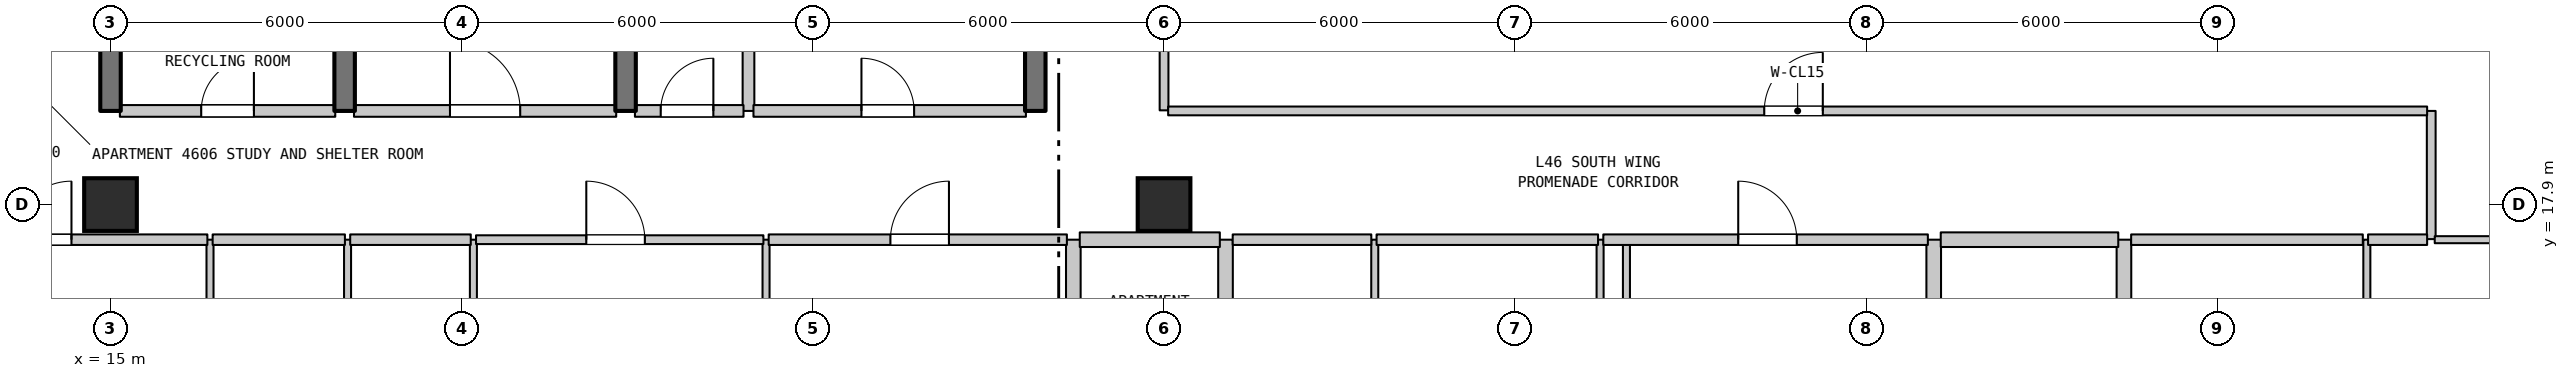
"""IFC4 building model, lengths in metres.
Left out: names, types, materials, properties, quantities, classifications, styles, units other than length and angle.
Written with IfcOpenShell. Run it as: python <this file> out.ifc"""

import sys

from ifc_helpers import new_model, si_unit, direction, frame, frame_2d, origin, origin_2d, place, context, subcontext, project, spatial, rectangle, extrude, element, fill, save


model = new_model("IFC4")
c1 = context("Model", 3, precision=1e-05, world=origin(), true_north=direction((0.0, 1.0)))
c2 = subcontext(c1, "Body", "Model", "MODEL_VIEW")
j1 = project(units=[si_unit("LENGTHUNIT", "METRE"), si_unit("PLANEANGLEUNIT", "RADIAN")], contexts=[c1])
p1 = place(None, origin())
s1 = spatial("IfcSite", under=j1, at=p1, CompositionType="ELEMENT")
p2 = place(p1, origin())
s2 = spatial("IfcBuilding", under=s1, at=p2, CompositionType="ELEMENT")
p3 = place(p2, frame((0.0, 0.0, 188.4)))
s3 = spatial("IfcBuildingStorey", under=s2, at=p3, CompositionType="ELEMENT", Elevation=188.4)
for number, where, z_axis, x_axis in (
    (1, (15.0, 17.9, 0.0), (0.0, 0.0, 1.0), (1.0, 0.0, 0.0)),
    (2, (33.0, 17.9, 0.0), (0.0, 0.0, 1.0), (1.0, 0.0, 0.0)),
):
    element("IfcColumn", number, at=place(p3, frame(where, z_axis=z_axis, x_axis=x_axis)), inside=s3, PredefinedType="COLUMN", context=c2, shape_type="SweptSolid", body=[
        extrude(rectangle(XDim=0.9, YDim=0.9, at=origin_2d()), origin(), (0.0, 0.0, 1.0), 3.7),
    ])
p4 = place(p3, frame((15.0, 19.5, 0.0), z_axis=(0.0, 0.0, 1.0), x_axis=(0.0, 1.0, 0.0)))
e3 = element("IfcWall", 3, at=p4, inside=s3, PredefinedType="SHEAR", context=c2, shape_type="SweptSolid", body=[
    extrude(rectangle(XDim=3.2, YDim=0.35, at=frame_2d((1.6, 0.0))), origin(), (0.0, 0.0, 1.0), 3.39),
])
p5 = place(p3, frame((16.7, 14.1, 0.0), z_axis=(0.0, 0.0, 1.0), x_axis=(0.0, 1.0, 0.0)))
e4 = element("IfcWall", 4, at=p5, inside=s3, PredefinedType="PARTITIONING", context=c2, shape_type="SweptSolid", body=[
    extrude(rectangle(XDim=3.2, YDim=0.12, at=frame_2d((1.6, 0.0))), origin(), (0.0, 0.0, 1.0), 3.39),
])
p6 = place(p5, frame((1.15, 0.0, 0.0)))
e5 = element("IfcOpeningElement", 5, at=p6, cuts=e4, PredefinedType="OPENING", context=c2, shape_type="SweptSolid", body=[
    extrude(rectangle(XDim=0.9, YDim=2.15, at=frame_2d((0.45, 1.075))), frame((0.0, 0.07, 0.0), z_axis=(0.0, -1.0, 0.0), x_axis=(1.0, 0.0, 0.0)), (0.0, 0.0, 1.0), 0.14),
])
p7 = place(p3, frame((19.0, 19.5, 0.0), z_axis=(0.0, 0.0, 1.0), x_axis=(0.0, 1.0, 0.0)))
e6 = element("IfcWall", 6, at=p7, inside=s3, PredefinedType="SHEAR", context=c2, shape_type="SweptSolid", body=[
    extrude(rectangle(XDim=3.2, YDim=0.35, at=frame_2d((1.6, 0.0))), origin(), (0.0, 0.0, 1.0), 3.39),
])
p8 = place(p3, frame((19.05, 14.1, 0.0), z_axis=(0.0, 0.0, 1.0), x_axis=(0.0, 1.0, 0.0)))
e7 = element("IfcWall", 7, at=p8, inside=s3, PredefinedType="PARTITIONING", context=c2, shape_type="SweptSolid", body=[
    extrude(rectangle(XDim=3.2, YDim=0.12, at=frame_2d((1.6, 0.0))), origin(), (0.0, 0.0, 1.0), 3.39),
])
p9 = place(p3, frame((21.2, 2.227, 0.0), z_axis=(0.0, 0.0, 1.0), x_axis=(0.0, 1.0, 0.0)))
e8 = element("IfcWall", 8, at=p9, inside=s3, PredefinedType="PARTITIONING", context=c2, shape_type="SweptSolid", body=[
    extrude(rectangle(XDim=15.073, YDim=0.12, at=frame_2d((7.537, 0.0))), origin(), (0.0, 0.0, 1.0), 3.39),
])
p10 = place(p3, frame((23.8, 19.5, 0.0), z_axis=(0.0, 0.0, 1.0), x_axis=(0.0, 1.0, 0.0)))
e9 = element("IfcWall", 9, at=p10, inside=s3, PredefinedType="SHEAR", context=c2, shape_type="SweptSolid", body=[
    extrude(rectangle(XDim=3.2, YDim=0.35, at=frame_2d((1.6, 0.0))), origin(), (0.0, 0.0, 1.0), 3.39),
])
p11 = place(p3, frame((25.9, 19.5, 0.0), z_axis=(0.0, 0.0, 1.0), x_axis=(0.0, 1.0, 0.0)))
e10 = element("IfcWall", 10, at=p11, inside=s3, PredefinedType="STANDARD", context=c2, shape_type="SweptSolid", body=[
    extrude(rectangle(XDim=3.2, YDim=0.2, at=frame_2d((1.6, 0.0))), origin(), (0.0, 0.0, 1.0), 3.39),
])
p12 = place(p3, frame((26.2, 14.85, 0.0), z_axis=(0.0, 0.0, 1.0), x_axis=(0.0, 1.0, 0.0)))
e11 = element("IfcWall", 11, at=p12, inside=s3, PredefinedType="PARTITIONING", context=c2, shape_type="SweptSolid", body=[
    extrude(rectangle(XDim=2.45, YDim=0.12, at=frame_2d((1.225, 0.0))), origin(), (0.0, 0.0, 1.0), 3.39),
])
p13 = place(p3, frame((30.8, 19.5, 0.0), z_axis=(0.0, 0.0, 1.0), x_axis=(0.0, 1.0, 0.0)))
e12 = element("IfcWall", 12, at=p13, inside=s3, PredefinedType="SHEAR", context=c2, shape_type="SweptSolid", body=[
    extrude(rectangle(XDim=3.2, YDim=0.35, at=frame_2d((1.6, 0.0))), origin(), (0.0, 0.0, 1.0), 3.39),
])
p14 = place(p3, frame((31.45, 11.15, 0.0), z_axis=(0.0, 0.0, 1.0), x_axis=(0.0, 1.0, 0.0)))
e13 = element("IfcWall", 13, at=p14, inside=s3, PredefinedType="STANDARD", context=c2, shape_type="SweptSolid", body=[
    extrude(rectangle(XDim=6.15, YDim=0.25, at=frame_2d((3.075, 0.0))), origin(), (0.0, 0.0, 1.0), 3.39),
])
p15 = place(p14, frame((2.529, 0.0, 0.0)))
e14 = element("IfcOpeningElement", 14, at=p15, cuts=e13, PredefinedType="OPENING", context=c2, shape_type="SweptSolid", body=[
    extrude(rectangle(XDim=0.95, YDim=2.15, at=frame_2d((0.475, 1.075))), frame((0.0, 0.135, 0.0), z_axis=(0.0, -1.0, 0.0), x_axis=(1.0, 0.0, 0.0)), (0.0, 0.0, 1.0), 0.27),
])
p16 = place(p3, frame((33.0, 19.51, 0.0), z_axis=(0.0, 0.0, 1.0), x_axis=(0.0, 1.0, 0.0)))
e15 = element("IfcWall", 15, at=p16, inside=s3, PredefinedType="STANDARD", context=c2, shape_type="SweptSolid", body=[
    extrude(rectangle(XDim=5.35, YDim=0.15, at=frame_2d((2.675, 0.0))), origin(), (0.0, 0.0, 1.0), 2.99),
])
p17 = place(p16, frame((1.534, 0.0, 0.0)))
e16 = element("IfcOpeningElement", 16, at=p17, cuts=e15, PredefinedType="OPENING", context=c2, shape_type="SweptSolid", body=[
    extrude(rectangle(XDim=1.0, YDim=2.15, at=frame_2d((0.5, 1.075))), frame((0.0, 0.085, 0.0), z_axis=(0.0, -1.0, 0.0), x_axis=(1.0, 0.0, 0.0)), (0.0, 0.0, 1.0), 0.17),
])
p18 = place(p3, frame((34.05, 11.15, 0.0), z_axis=(0.0, 0.0, 1.0), x_axis=(0.0, 1.0, 0.0)))
e17 = element("IfcWall", 17, at=p18, inside=s3, PredefinedType="STANDARD", context=c2, shape_type="SweptSolid", body=[
    extrude(rectangle(XDim=6.15, YDim=0.25, at=frame_2d((3.075, 0.0))), origin(), (0.0, 0.0, 1.0), 3.39),
])
for number, where, z_axis, x_axis in (
    (18, (36.6, 11.15, 0.0), (0.0, 0.0, 1.0), (0.0, 1.0, 0.0)),
    (19, (40.45, 11.15, 0.0), (0.0, 0.0, 1.0), (0.0, 1.0, 0.0)),
):
    element("IfcWall", number, at=place(p3, frame(where, z_axis=z_axis, x_axis=x_axis)), inside=s3, PredefinedType="PARTITIONING", context=c2, shape_type="SweptSolid", body=[
        extrude(rectangle(XDim=6.15, YDim=0.12, at=frame_2d((3.075, 0.0))), origin(), (0.0, 0.0, 1.0), 3.39),
    ])
p19 = place(p3, frame((40.9, 14.85, 0.0), z_axis=(0.0, 0.0, 1.0), x_axis=(0.0, 1.0, 0.0)))
e20 = element("IfcWall", 20, at=p19, inside=s3, PredefinedType="PARTITIONING", context=c2, shape_type="SweptSolid", body=[
    extrude(rectangle(XDim=2.45, YDim=0.12, at=frame_2d((1.225, 0.0))), origin(), (0.0, 0.0, 1.0), 3.39),
])
for number, where, z_axis, x_axis in (
    (21, (46.15, 11.15, 0.0), (0.0, 0.0, 1.0), (0.0, 1.0, 0.0)),
    (22, (49.4, 11.15, 0.0), (0.0, 0.0, 1.0), (0.0, 1.0, 0.0)),
):
    element("IfcWall", number, at=place(p3, frame(where, z_axis=z_axis, x_axis=x_axis)), inside=s3, PredefinedType="STANDARD", context=c2, shape_type="SweptSolid", body=[
        extrude(rectangle(XDim=6.15, YDim=0.25, at=frame_2d((3.075, 0.0))), origin(), (0.0, 0.0, 1.0), 3.39),
    ])
p20 = place(p3, frame((53.55, 11.15, 0.0), z_axis=(0.0, 0.0, 1.0), x_axis=(0.0, 1.0, 0.0)))
e23 = element("IfcWall", 23, at=p20, inside=s3, PredefinedType="PARTITIONING", context=c2, shape_type="SweptSolid", body=[
    extrude(rectangle(XDim=6.15, YDim=0.12, at=frame_2d((3.075, 0.0))), origin(), (0.0, 0.0, 1.0), 3.39),
])
p21 = place(p3, frame((54.65, 17.31, 0.0), z_axis=(0.0, 0.0, 1.0), x_axis=(0.0, 1.0, 0.0)))
e24 = element("IfcWall", 24, at=p21, inside=s3, PredefinedType="STANDARD", context=c2, shape_type="SweptSolid", body=[
    extrude(rectangle(XDim=2.19, YDim=0.15, at=frame_2d((1.095, 0.0))), origin(), (0.0, 0.0, 1.0), 3.39),
])
p22 = place(p3, frame((12.875, 17.3, 0.0), z_axis=(0.0, 0.0, 1.0), x_axis=(1.0, 0.0, 0.0)))
e25 = element("IfcWall", 25, at=p22, inside=s3, PredefinedType="STANDARD", context=c2, shape_type="SweptSolid", body=[
    extrude(rectangle(XDim=3.78, YDim=0.18, at=frame_2d((1.89, 0.0))), origin(), (0.0, 0.0, 1.0), 3.39),
])
p23 = place(p22, frame((0.458, 0.0, 0.0)))
e26 = element("IfcOpeningElement", 26, at=p23, cuts=e25, PredefinedType="OPENING", context=c2, shape_type="SweptSolid", body=[
    extrude(rectangle(XDim=1.0, YDim=2.15, at=frame_2d((0.5, 1.075))), frame((0.0, 0.1, 0.0), z_axis=(0.0, -1.0, 0.0), x_axis=(1.0, 0.0, 0.0)), (0.0, 0.0, 1.0), 0.2),
])
p24 = place(p3, frame((16.745, 17.3, 0.0), z_axis=(0.0, 0.0, 1.0), x_axis=(1.0, 0.0, 0.0)))
e27 = element("IfcWall", 27, at=p24, inside=s3, PredefinedType="STANDARD", context=c2, shape_type="SweptSolid", body=[
    extrude(rectangle(XDim=2.26, YDim=0.18, at=frame_2d((1.13, 0.0))), origin(), (0.0, 0.0, 1.0), 3.39),
])
p25 = place(p3, frame((19.095, 17.3, 0.0), z_axis=(0.0, 0.0, 1.0), x_axis=(1.0, 0.0, 0.0)))
e28 = element("IfcWall", 28, at=p25, inside=s3, PredefinedType="STANDARD", context=c2, shape_type="SweptSolid", body=[
    extrude(rectangle(XDim=2.06, YDim=0.18, at=frame_2d((1.03, 0.0))), origin(), (0.0, 0.0, 1.0), 3.39),
])
p26 = place(p3, frame((21.245, 17.3, 0.0), z_axis=(0.0, 0.0, 1.0), x_axis=(1.0, 0.0, 0.0)))
e29 = element("IfcWall", 29, at=p26, inside=s3, PredefinedType="STANDARD", context=c2, shape_type="SweptSolid", body=[
    extrude(rectangle(XDim=4.91, YDim=0.15, at=frame_2d((2.455, 0.0))), origin(), (0.0, 0.0, 1.0), 3.39),
])
p27 = place(p26, frame((1.884, 0.0, 0.0)))
e30 = element("IfcOpeningElement", 30, at=p27, cuts=e29, PredefinedType="OPENING", context=c2, shape_type="SweptSolid", body=[
    extrude(rectangle(XDim=1.0, YDim=2.15, at=frame_2d((0.5, 1.075))), frame((0.0, 0.085, 0.0), z_axis=(0.0, -1.0, 0.0), x_axis=(1.0, 0.0, 0.0)), (0.0, 0.0, 1.0), 0.17),
])
p28 = place(p3, frame((26.245, 17.3, 0.0), z_axis=(0.0, 0.0, 1.0), x_axis=(1.0, 0.0, 0.0)))
e31 = element("IfcWall", 31, at=p28, inside=s3, PredefinedType="STANDARD", context=c2, shape_type="SweptSolid", body=[
    extrude(rectangle(XDim=5.095, YDim=0.18, at=frame_2d((2.547, 0.0))), origin(), (0.0, 0.0, 1.0), 3.39),
])
p29 = place(p28, frame((2.08, 0.0, 0.0)))
e32 = element("IfcOpeningElement", 32, at=p29, cuts=e31, PredefinedType="OPENING", context=c2, shape_type="SweptSolid", body=[
    extrude(rectangle(XDim=1.0, YDim=2.15, at=frame_2d((0.5, 1.075))), frame((0.0, 0.1, 0.0), z_axis=(0.0, -1.0, 0.0), x_axis=(1.0, 0.0, 0.0)), (0.0, 0.0, 1.0), 0.2),
])
p30 = place(p3, frame((31.56, 17.3, 0.0), z_axis=(0.0, 0.0, 1.0), x_axis=(1.0, 0.0, 0.0)))
e33 = element("IfcWall", 33, at=p30, inside=s3, PredefinedType="STANDARD", context=c2, shape_type="SweptSolid", body=[
    extrude(rectangle(XDim=2.393, YDim=0.25, at=frame_2d((1.196, 0.0))), origin(), (0.0, 0.0, 1.0), 3.39),
])
p31 = place(p3, frame((34.173, 17.3, 0.0), z_axis=(0.0, 0.0, 1.0), x_axis=(1.0, 0.0, 0.0)))
e34 = element("IfcWall", 34, at=p31, inside=s3, PredefinedType="STANDARD", context=c2, shape_type="SweptSolid", body=[
    extrude(rectangle(XDim=2.368, YDim=0.18, at=frame_2d((1.184, 0.0))), origin(), (0.0, 0.0, 1.0), 3.39),
])
p32 = place(p3, frame((36.631, 17.3, 0.0), z_axis=(0.0, 0.0, 1.0), x_axis=(1.0, 0.0, 0.0)))
e35 = element("IfcWall", 35, at=p32, inside=s3, PredefinedType="STANDARD", context=c2, shape_type="SweptSolid", body=[
    extrude(rectangle(XDim=3.784, YDim=0.18, at=frame_2d((1.892, 0.0))), origin(), (0.0, 0.0, 1.0), 3.39),
])
p33 = place(p3, frame((40.505, 17.3, 0.0), z_axis=(0.0, 0.0, 1.0), x_axis=(1.0, 0.0, 0.0)))
e36 = element("IfcWall", 36, at=p33, inside=s3, PredefinedType="STANDARD", context=c2, shape_type="SweptSolid", body=[
    extrude(rectangle(XDim=5.545, YDim=0.18, at=frame_2d((2.772, 0.0))), origin(), (0.0, 0.0, 1.0), 3.39),
])
p34 = place(p33, frame((2.305, 0.0, 0.0)))
e37 = element("IfcOpeningElement", 37, at=p34, cuts=e36, PredefinedType="OPENING", context=c2, shape_type="SweptSolid", body=[
    extrude(rectangle(XDim=1.0, YDim=2.15, at=frame_2d((0.5, 1.075))), frame((0.0, 0.1, 0.0), z_axis=(0.0, -1.0, 0.0), x_axis=(1.0, 0.0, 0.0)), (0.0, 0.0, 1.0), 0.2),
])
p35 = place(p3, frame((46.27, 17.3, 0.0), z_axis=(0.0, 0.0, 1.0), x_axis=(1.0, 0.0, 0.0)))
e38 = element("IfcWall", 38, at=p35, inside=s3, PredefinedType="STANDARD", context=c2, shape_type="SweptSolid", body=[
    extrude(rectangle(XDim=3.033, YDim=0.25, at=frame_2d((1.517, 0.0))), origin(), (0.0, 0.0, 1.0), 3.39),
])
p36 = place(p3, frame((49.523, 17.3, 0.0), z_axis=(0.0, 0.0, 1.0), x_axis=(1.0, 0.0, 0.0)))
e39 = element("IfcWall", 39, at=p36, inside=s3, PredefinedType="STANDARD", context=c2, shape_type="SweptSolid", body=[
    extrude(rectangle(XDim=3.958, YDim=0.18, at=frame_2d((1.979, 0.0))), origin(), (0.0, 0.0, 1.0), 3.39),
])
p37 = place(p3, frame((53.571, 17.3, 0.0), z_axis=(0.0, 0.0, 1.0), x_axis=(1.0, 0.0, 0.0)))
e40 = element("IfcWall", 40, at=p37, inside=s3, PredefinedType="STANDARD", context=c2, shape_type="SweptSolid", body=[
    extrude(rectangle(XDim=1.009, YDim=0.18, at=frame_2d((0.504, 0.0))), origin(), (0.0, 0.0, 1.0), 3.39),
])
p38 = place(p3, frame((54.71, 17.3, 0.0), z_axis=(0.0, 0.0, 1.0), x_axis=(1.0, 0.0, 0.0)))
e41 = element("IfcWall", 41, at=p38, inside=s3, PredefinedType="PARTITIONING", context=c2, shape_type="SweptSolid", body=[
    extrude(rectangle(XDim=1.635, YDim=0.12, at=frame_2d((0.817, 0.0))), origin(), (0.0, 0.0, 1.0), 3.39),
])
p39 = place(p3, frame((15.16, 19.5, 0.0), z_axis=(0.0, 0.0, 1.0), x_axis=(1.0, 0.0, 0.0)))
e42 = element("IfcWall", 42, at=p39, inside=s3, PredefinedType="STANDARD", context=c2, shape_type="SweptSolid", body=[
    extrude(rectangle(XDim=3.68, YDim=0.2, at=frame_2d((1.84, 0.0))), origin(), (0.0, 0.0, 1.0), 3.39),
])
p40 = place(p39, frame((1.39, 0.0, 0.0)))
e43 = element("IfcOpeningElement", 43, at=p40, cuts=e42, PredefinedType="OPENING", context=c2, shape_type="SweptSolid", body=[
    extrude(rectangle(XDim=0.9, YDim=2.15, at=frame_2d((0.45, 1.075))), frame((0.0, 0.11, 0.0), z_axis=(0.0, -1.0, 0.0), x_axis=(1.0, 0.0, 0.0)), (0.0, 0.0, 1.0), 0.22),
])
p41 = place(p3, frame((19.16, 19.5, 0.0), z_axis=(0.0, 0.0, 1.0), x_axis=(1.0, 0.0, 0.0)))
e44 = element("IfcWall", 44, at=p41, inside=s3, PredefinedType="STANDARD", context=c2, shape_type="SweptSolid", body=[
    extrude(rectangle(XDim=4.48, YDim=0.2, at=frame_2d((2.24, 0.0))), origin(), (0.0, 0.0, 1.0), 3.39),
])
p42 = place(p41, frame((1.64, 0.0, 0.0)))
e45 = element("IfcOpeningElement", 45, at=p42, cuts=e44, PredefinedType="OPENING", context=c2, shape_type="SweptSolid", body=[
    extrude(rectangle(XDim=1.2, YDim=2.2, at=frame_2d((0.6, 1.1))), frame((0.0, 0.11, 0.0), z_axis=(0.0, -1.0, 0.0), x_axis=(1.0, 0.0, 0.0)), (0.0, 0.0, 1.0), 0.22),
])
p43 = place(p3, frame((23.96, 19.5, 0.0), z_axis=(0.0, 0.0, 1.0), x_axis=(1.0, 0.0, 0.0)))
e46 = element("IfcWall", 46, at=p43, inside=s3, PredefinedType="STANDARD", context=c2, shape_type="SweptSolid", body=[
    extrude(rectangle(XDim=1.855, YDim=0.2, at=frame_2d((0.927, 0.0))), origin(), (0.0, 0.0, 1.0), 3.39),
])
p44 = place(p43, frame((0.44, 0.0, 0.0)))
e47 = element("IfcOpeningElement", 47, at=p44, cuts=e46, PredefinedType="OPENING", context=c2, shape_type="SweptSolid", body=[
    extrude(rectangle(XDim=0.9, YDim=2.15, at=frame_2d((0.45, 1.075))), frame((0.0, 0.11, 0.0), z_axis=(0.0, -1.0, 0.0), x_axis=(1.0, 0.0, 0.0)), (0.0, 0.0, 1.0), 0.22),
])
p45 = place(p3, frame((25.985, 19.5, 0.0), z_axis=(0.0, 0.0, 1.0), x_axis=(1.0, 0.0, 0.0)))
e48 = element("IfcWall", 48, at=p45, inside=s3, PredefinedType="STANDARD", context=c2, shape_type="SweptSolid", body=[
    extrude(rectangle(XDim=4.655, YDim=0.2, at=frame_2d((2.327, 0.0))), origin(), (0.0, 0.0, 1.0), 3.39),
])
p46 = place(p45, frame((1.845, 0.0, 0.0)))
e49 = element("IfcOpeningElement", 49, at=p46, cuts=e48, PredefinedType="OPENING", context=c2, shape_type="SweptSolid", body=[
    extrude(rectangle(XDim=0.9, YDim=2.15, at=frame_2d((0.45, 1.075))), frame((0.0, 0.11, 0.0), z_axis=(0.0, -1.0, 0.0), x_axis=(1.0, 0.0, 0.0)), (0.0, 0.0, 1.0), 0.22),
])
p47 = place(p3, frame((33.07, 19.5, 0.0), z_axis=(0.0, 0.0, 1.0), x_axis=(1.0, 0.0, 0.0)))
e50 = element("IfcWall", 50, at=p47, inside=s3, PredefinedType="STANDARD", context=c2, shape_type="SweptSolid", body=[
    extrude(rectangle(XDim=21.51, YDim=0.15, at=frame_2d((10.755, 0.0))), origin(), (0.0, 0.0, 1.0), 3.39),
])
p48 = place(p47, frame((10.185, 0.0, 0.0)))
e51 = element("IfcOpeningElement", 51, at=p48, cuts=e50, PredefinedType="OPENING", context=c2, shape_type="SweptSolid", body=[
    extrude(rectangle(XDim=1.0, YDim=2.15, at=frame_2d((0.5, 1.075))), frame((0.0, 0.085, 0.0), z_axis=(0.0, -1.0, 0.0), x_axis=(1.0, 0.0, 0.0)), (0.0, 0.0, 1.0), 0.17),
])
p49 = place(p23, origin())
e52 = element("IfcDoor", 52, at=p49, inside=s3, OperationType="SINGLE_SWING_RIGHT", PredefinedType="DOOR", context=c2, shape_type="SweptSolid", body=[
    extrude(rectangle(XDim=1.0, YDim=2.15, at=frame_2d((0.5, 1.075))), frame((0.0, 0.025, 0.0), z_axis=(0.0, -1.0, 0.0), x_axis=(1.0, 0.0, 0.0)), (0.0, 0.0, 1.0), 0.05),
])
fill(e26, e52)
p50 = place(p27, origin())
e53 = element("IfcDoor", 53, at=p50, inside=s3, OperationType="SINGLE_SWING_LEFT", PredefinedType="DOOR", context=c2, shape_type="SweptSolid", body=[
    extrude(rectangle(XDim=1.0, YDim=2.15, at=frame_2d((0.5, 1.075))), frame((0.0, 0.025, 0.0), z_axis=(0.0, -1.0, 0.0), x_axis=(1.0, 0.0, 0.0)), (0.0, 0.0, 1.0), 0.05),
])
fill(e30, e53)
p51 = place(p29, origin())
e54 = element("IfcDoor", 54, at=p51, inside=s3, OperationType="SINGLE_SWING_RIGHT", PredefinedType="DOOR", context=c2, shape_type="SweptSolid", body=[
    extrude(rectangle(XDim=1.0, YDim=2.15, at=frame_2d((0.5, 1.075))), frame((0.0, 0.025, 0.0), z_axis=(0.0, -1.0, 0.0), x_axis=(1.0, 0.0, 0.0)), (0.0, 0.0, 1.0), 0.05),
])
fill(e32, e54)
p52 = place(p34, origin())
e55 = element("IfcDoor", 55, at=p52, inside=s3, OperationType="SINGLE_SWING_LEFT", PredefinedType="DOOR", context=c2, shape_type="SweptSolid", body=[
    extrude(rectangle(XDim=1.0, YDim=2.15, at=frame_2d((0.5, 1.075))), frame((0.0, 0.025, 0.0), z_axis=(0.0, -1.0, 0.0), x_axis=(1.0, 0.0, 0.0)), (0.0, 0.0, 1.0), 0.05),
])
fill(e37, e55)
p53 = place(p40, origin())
e56 = element("IfcDoor", 56, at=p53, inside=s3, OperationType="SINGLE_SWING_RIGHT", PredefinedType="DOOR", context=c2, shape_type="SweptSolid", body=[
    extrude(rectangle(XDim=0.9, YDim=2.15, at=frame_2d((0.45, 1.075))), frame((0.0, 0.025, 0.0), z_axis=(0.0, -1.0, 0.0), x_axis=(1.0, 0.0, 0.0)), (0.0, 0.0, 1.0), 0.05),
])
fill(e43, e56)
p54 = place(p42, origin())
e57 = element("IfcDoor", 57, at=p54, inside=s3, OperationType="SINGLE_SWING_LEFT", PredefinedType="DOOR", context=c2, shape_type="SweptSolid", body=[
    extrude(rectangle(XDim=1.2, YDim=2.2, at=frame_2d((0.6, 1.1))), frame((0.0, 0.025, 0.0), z_axis=(0.0, -1.0, 0.0), x_axis=(1.0, 0.0, 0.0)), (0.0, 0.0, 1.0), 0.05),
])
fill(e45, e57)
p55 = place(p44, origin())
e58 = element("IfcDoor", 58, at=p55, inside=s3, OperationType="SINGLE_SWING_RIGHT", PredefinedType="DOOR", context=c2, shape_type="SweptSolid", body=[
    extrude(rectangle(XDim=0.9, YDim=2.15, at=frame_2d((0.45, 1.075))), frame((0.0, 0.025, 0.0), z_axis=(0.0, -1.0, 0.0), x_axis=(1.0, 0.0, 0.0)), (0.0, 0.0, 1.0), 0.05),
])
fill(e47, e58)
p56 = place(p46, origin())
e59 = element("IfcDoor", 59, at=p56, inside=s3, OperationType="SINGLE_SWING_LEFT", PredefinedType="DOOR", context=c2, shape_type="SweptSolid", body=[
    extrude(rectangle(XDim=0.9, YDim=2.15, at=frame_2d((0.45, 1.075))), frame((0.0, 0.025, 0.0), z_axis=(0.0, -1.0, 0.0), x_axis=(1.0, 0.0, 0.0)), (0.0, 0.0, 1.0), 0.05),
])
fill(e49, e59)
p57 = place(p48, origin())
e60 = element("IfcDoor", 60, at=p57, inside=s3, OperationType="SINGLE_SWING_RIGHT", PredefinedType="DOOR", context=c2, shape_type="SweptSolid", body=[
    extrude(rectangle(XDim=1.0, YDim=2.15, at=frame_2d((0.5, 1.075))), frame((0.0, 0.025, 0.0), z_axis=(0.0, -1.0, 0.0), x_axis=(1.0, 0.0, 0.0)), (0.0, 0.0, 1.0), 0.05),
])
fill(e51, e60)
save(model, sys.argv[1])
